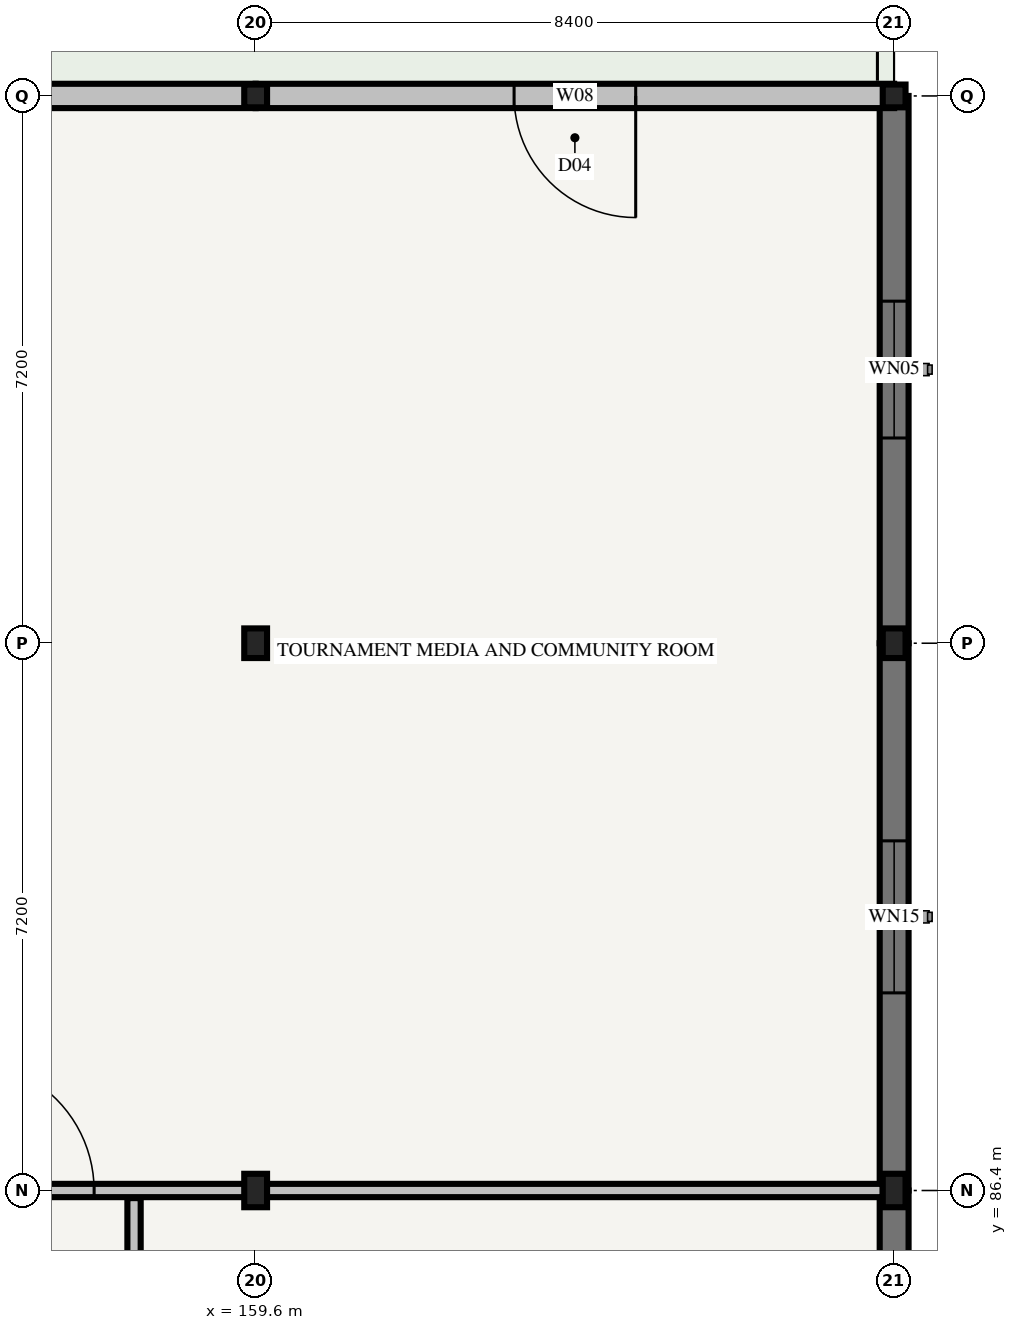
"""IFC4 building model, lengths in metres.
Left out: names, types, materials, properties, quantities, classifications, styles, units other than length and angle.
Written with IfcOpenShell. Run it as: python <this file> out.ifc"""

import sys

from ifc_helpers import new_model, si_unit, direction, frame, frame_2d, origin, origin_2d, place, context, subcontext, project, spatial, rectangle, i_section, extrude, element, fill, save


model = new_model("IFC4")
c1 = context("Model", 3, precision=1e-05, world=origin(), true_north=direction((0.0, 1.0)))
c2 = subcontext(c1, "Body", "Model", "MODEL_VIEW")
j1 = project(units=[si_unit("LENGTHUNIT", "METRE"), si_unit("PLANEANGLEUNIT", "RADIAN")], contexts=[c1])
p1 = place(None, origin())
s1 = spatial("IfcSite", under=j1, at=p1, CompositionType="ELEMENT")
p2 = place(p1, origin())
s2 = spatial("IfcBuilding", under=s1, at=p2, CompositionType="ELEMENT")
p3 = place(p2, frame((0.0, 0.0, 4.5)))
s3 = spatial("IfcBuildingStorey", under=s2, at=p3, CompositionType="ELEMENT", Elevation=4.5)
p4 = place(p3, frame((159.6, 86.4, 0.0), z_axis=(0.0, 0.0, 1.0), x_axis=(1.0, 0.0, 0.0)))
e1 = element("IfcColumn", 1, at=p4, inside=s3, PredefinedType="COLUMN", context=c2, shape_type="SweptSolid", body=[
    extrude(i_section(OverallWidth=0.3, OverallDepth=0.44, WebThickness=0.011, FlangeThickness=0.021, FilletRadius=0.027, at=origin_2d()), origin(), (0.0, 0.0, 1.0), 4.2),
])
p5 = place(p3, frame((159.6, 93.6, 0.0), z_axis=(0.0, 0.0, 1.0), x_axis=(1.0, 0.0, 0.0)))
e2 = element("IfcColumn", 2, at=p5, inside=s3, PredefinedType="COLUMN", context=c2, shape_type="SweptSolid", body=[
    extrude(i_section(OverallWidth=0.3, OverallDepth=0.39, WebThickness=0.011, FlangeThickness=0.019, FilletRadius=0.027, at=origin_2d()), origin(), (0.0, 0.0, 1.0), 4.2),
])
p6 = place(p3, frame((159.6, 100.8, 0.0), z_axis=(0.0, 0.0, 1.0), x_axis=(1.0, 0.0, 0.0)))
e3 = element("IfcColumn", 3, at=p6, inside=s3, PredefinedType="COLUMN", context=c2, shape_type="SweptSolid", body=[
    extrude(i_section(OverallWidth=0.3, OverallDepth=0.3, WebThickness=0.011, FlangeThickness=0.019, FilletRadius=0.027, at=origin_2d()), origin(), (0.0, 0.0, 1.0), 4.2),
])
p7 = place(p3, frame((168.0, 86.4, 0.0), z_axis=(0.0, 0.0, 1.0), x_axis=(1.0, 0.0, 0.0)))
e4 = element("IfcColumn", 4, at=p7, inside=s3, PredefinedType="COLUMN", context=c2, shape_type="SweptSolid", body=[
    extrude(i_section(OverallWidth=0.3, OverallDepth=0.44, WebThickness=0.011, FlangeThickness=0.021, FilletRadius=0.027, at=origin_2d()), origin(), (0.0, 0.0, 1.0), 4.2),
])
p8 = place(p3, frame((168.0, 93.6, 0.0), z_axis=(0.0, 0.0, 1.0), x_axis=(1.0, 0.0, 0.0)))
e5 = element("IfcColumn", 5, at=p8, inside=s3, PredefinedType="COLUMN", context=c2, shape_type="SweptSolid", body=[
    extrude(i_section(OverallWidth=0.3, OverallDepth=0.39, WebThickness=0.011, FlangeThickness=0.019, FilletRadius=0.027, at=origin_2d()), origin(), (0.0, 0.0, 1.0), 4.2),
])
p9 = place(p3, frame((168.0, 100.8, 0.0), z_axis=(0.0, 0.0, 1.0), x_axis=(1.0, 0.0, 0.0)))
e6 = element("IfcColumn", 6, at=p9, inside=s3, PredefinedType="COLUMN", context=c2, shape_type="SweptSolid", body=[
    extrude(i_section(OverallWidth=0.3, OverallDepth=0.3, WebThickness=0.011, FlangeThickness=0.019, FilletRadius=0.027, at=origin_2d()), origin(), (0.0, 0.0, 1.0), 4.2),
])
p10 = place(p3, frame((168.0, 79.2, 0.0), z_axis=(0.0, 0.0, 1.0), x_axis=(0.0, 1.0, 0.0)))
e7 = element("IfcWall", 7, at=p10, inside=s3, PredefinedType="SOLIDWALL", context=c2, shape_type="SweptSolid", body=[
    extrude(rectangle(XDim=7.2, YDim=0.38, at=frame_2d((3.6, 0.0))), origin(), (0.0, 0.0, 1.0), 3.385),
])
p11 = place(p10, frame((2.4, 0.0, 0.85)))
e8 = element("IfcOpeningElement", 8, at=p11, cuts=e7, PredefinedType="OPENING", context=c2, shape_type="SweptSolid", body=[
    extrude(rectangle(XDim=2.4, YDim=1.8, at=frame_2d((1.2, 0.9))), frame((0.0, 0.215, 0.0), z_axis=(0.0, -1.0, 0.0), x_axis=(1.0, 0.0, 0.0)), (0.0, 0.0, 1.0), 0.43),
])
p12 = place(p3, frame((168.0, 86.4, 0.0), z_axis=(0.0, 0.0, 1.0), x_axis=(0.0, 1.0, 0.0)))
e9 = element("IfcWall", 9, at=p12, inside=s3, PredefinedType="SOLIDWALL", context=c2, shape_type="SweptSolid", body=[
    extrude(rectangle(XDim=7.2, YDim=0.38, at=frame_2d((3.6, 0.0))), origin(), (0.0, 0.0, 1.0), 3.355),
])
p13 = place(p12, frame((2.6, 0.0, 0.85)))
e10 = element("IfcOpeningElement", 10, at=p13, cuts=e9, PredefinedType="OPENING", context=c2, shape_type="SweptSolid", body=[
    extrude(rectangle(XDim=2.0, YDim=1.6, at=frame_2d((1.0, 0.8))), frame((0.0, 0.215, 0.0), z_axis=(0.0, -1.0, 0.0), x_axis=(1.0, 0.0, 0.0)), (0.0, 0.0, 1.0), 0.43),
])
p14 = place(p3, frame((168.0, 93.6, 0.0), z_axis=(0.0, 0.0, 1.0), x_axis=(0.0, 1.0, 0.0)))
e11 = element("IfcWall", 11, at=p14, inside=s3, PredefinedType="SOLIDWALL", context=c2, shape_type="SweptSolid", body=[
    extrude(rectangle(XDim=7.2, YDim=0.38, at=frame_2d((3.6, 0.0))), origin(), (0.0, 0.0, 1.0), 3.355),
])
p15 = place(p14, frame((2.7, 0.0, 0.85)))
e12 = element("IfcOpeningElement", 12, at=p15, cuts=e11, PredefinedType="OPENING", context=c2, shape_type="SweptSolid", body=[
    extrude(rectangle(XDim=1.8, YDim=1.8, at=frame_2d((0.9, 0.9))), frame((0.0, 0.215, 0.0), z_axis=(0.0, -1.0, 0.0), x_axis=(1.0, 0.0, 0.0)), (0.0, 0.0, 1.0), 0.43),
])
p16 = place(p3, frame((168.0, 100.8, 0.0), z_axis=(0.0, 0.0, 1.0), x_axis=(-1.0, 0.0, 0.0)))
e13 = element("IfcWall", 13, at=p16, inside=s3, PredefinedType="STANDARD", context=c2, shape_type="SweptSolid", body=[
    extrude(rectangle(XDim=8.4, YDim=0.32, at=frame_2d((4.2, 0.0))), origin(), (0.0, 0.0, 1.0), 3.455),
])
p17 = place(p16, frame((3.4, 0.0, 0.0)))
e14 = element("IfcOpeningElement", 14, at=p17, cuts=e13, PredefinedType="OPENING", context=c2, shape_type="SweptSolid", body=[
    extrude(rectangle(XDim=1.6, YDim=2.3, at=frame_2d((0.8, 1.15))), frame((0.0, 0.185, 0.0), z_axis=(0.0, -1.0, 0.0), x_axis=(1.0, 0.0, 0.0)), (0.0, 0.0, 1.0), 0.37),
])
p18 = place(p3, frame((159.6, 100.8, 0.0), z_axis=(0.0, 0.0, 1.0), x_axis=(-1.0, 0.0, 0.0)))
e15 = element("IfcWall", 15, at=p18, inside=s3, PredefinedType="STANDARD", context=c2, shape_type="SweptSolid", body=[
    extrude(rectangle(XDim=8.4, YDim=0.32, at=frame_2d((4.2, 0.0))), origin(), (0.0, 0.0, 1.0), 3.405),
])
p19 = place(p18, frame((3.6, 0.0, 0.0)))
e16 = element("IfcOpeningElement", 16, at=p19, cuts=e15, PredefinedType="OPENING", context=c2, shape_type="SweptSolid", body=[
    extrude(rectangle(XDim=1.2, YDim=2.25, at=frame_2d((0.6, 1.125))), frame((0.0, 0.185, 0.0), z_axis=(0.0, -1.0, 0.0), x_axis=(1.0, 0.0, 0.0)), (0.0, 0.0, 1.0), 0.37),
])
p20 = place(p3, frame((158.0, 64.9, 0.0), z_axis=(0.0, 0.0, 1.0), x_axis=(0.0, 1.0, 0.0)))
e17 = element("IfcWall", 17, at=p20, inside=s3, PredefinedType="PARTITIONING", context=c2, shape_type="SweptSolid", body=[
    extrude(rectangle(XDim=21.4, YDim=0.175, at=frame_2d((10.7, 0.0))), origin(), (0.0, 0.0, 1.0), 3.32),
])
p21 = place(p20, frame((9.95, 0.0, 0.0)))
e18 = element("IfcOpeningElement", 18, at=p21, cuts=e17, PredefinedType="OPENING", context=c2, shape_type="SweptSolid", body=[
    extrude(rectangle(XDim=1.5, YDim=2.2, at=frame_2d((0.75, 1.1))), frame((0.0, 0.112, 0.0), z_axis=(0.0, -1.0, 0.0), x_axis=(1.0, 0.0, 0.0)), (0.0, 0.0, 1.0), 0.225),
])
p22 = place(p3, frame((151.4, 86.4, 0.0), z_axis=(0.0, 0.0, 1.0), x_axis=(1.0, 0.0, 0.0)))
e19 = element("IfcWall", 19, at=p22, inside=s3, PredefinedType="PARTITIONING", context=c2, shape_type="SweptSolid", body=[
    extrude(rectangle(XDim=16.45, YDim=0.175, at=frame_2d((8.225, 0.0))), origin(), (0.0, 0.0, 1.0), 3.32),
])
p23 = place(p22, frame((4.375, 0.0, 0.0)))
e20 = element("IfcOpeningElement", 20, at=p23, cuts=e19, PredefinedType="OPENING", context=c2, shape_type="SweptSolid", body=[
    extrude(rectangle(XDim=1.7, YDim=2.25, at=frame_2d((0.85, 1.125))), frame((0.0, 0.112, 0.0), z_axis=(0.0, -1.0, 0.0), x_axis=(1.0, 0.0, 0.0)), (0.0, 0.0, 1.0), 0.225),
])
p24 = place(p13, origin())
e21 = element("IfcWindow", 21, at=p24, inside=s3, PartitioningType="SINGLE_PANEL", PredefinedType="WINDOW", context=c2, shape_type="SweptSolid", body=[
    extrude(rectangle(XDim=2.0, YDim=1.6, at=frame_2d((1.0, 0.8))), frame((0.0, 0.03, 0.0), z_axis=(0.0, -1.0, 0.0), x_axis=(1.0, 0.0, 0.0)), (0.0, 0.0, 1.0), 0.06),
])
fill(e10, e21)
p25 = place(p15, origin())
e22 = element("IfcWindow", 22, at=p25, inside=s3, PartitioningType="SINGLE_PANEL", PredefinedType="WINDOW", context=c2, shape_type="SweptSolid", body=[
    extrude(rectangle(XDim=1.8, YDim=1.8, at=frame_2d((0.9, 0.9))), frame((0.0, 0.03, 0.0), z_axis=(0.0, -1.0, 0.0), x_axis=(1.0, 0.0, 0.0)), (0.0, 0.0, 1.0), 0.06),
])
fill(e12, e22)
p26 = place(p17, frame((1.6, 0.0, 0.0), z_axis=(0.0, 0.0, 1.0), x_axis=(-1.0, 0.0, 0.0)))
e23 = element("IfcDoor", 23, at=p26, inside=s3, OperationType="DOUBLE_DOOR_SINGLE_SWING", PredefinedType="DOOR", context=c2, shape_type="SweptSolid", body=[
    extrude(rectangle(XDim=1.6, YDim=2.3, at=frame_2d((0.8, 1.15))), frame((0.0, 0.025, 0.0), z_axis=(0.0, -1.0, 0.0), x_axis=(1.0, 0.0, 0.0)), (0.0, 0.0, 1.0), 0.05),
])
fill(e14, e23)
p27 = place(p23, frame((1.7, 0.0, 0.0), z_axis=(0.0, 0.0, 1.0), x_axis=(-1.0, 0.0, 0.0)))
e24 = element("IfcDoor", 24, at=p27, inside=s3, OperationType="DOUBLE_DOOR_SINGLE_SWING", PredefinedType="DOOR", context=c2, shape_type="SweptSolid", body=[
    extrude(rectangle(XDim=1.7, YDim=2.25, at=frame_2d((0.85, 1.125))), frame((0.0, 0.025, 0.0), z_axis=(0.0, -1.0, 0.0), x_axis=(1.0, 0.0, 0.0)), (0.0, 0.0, 1.0), 0.05),
])
fill(e20, e24)
save(model, sys.argv[1])
